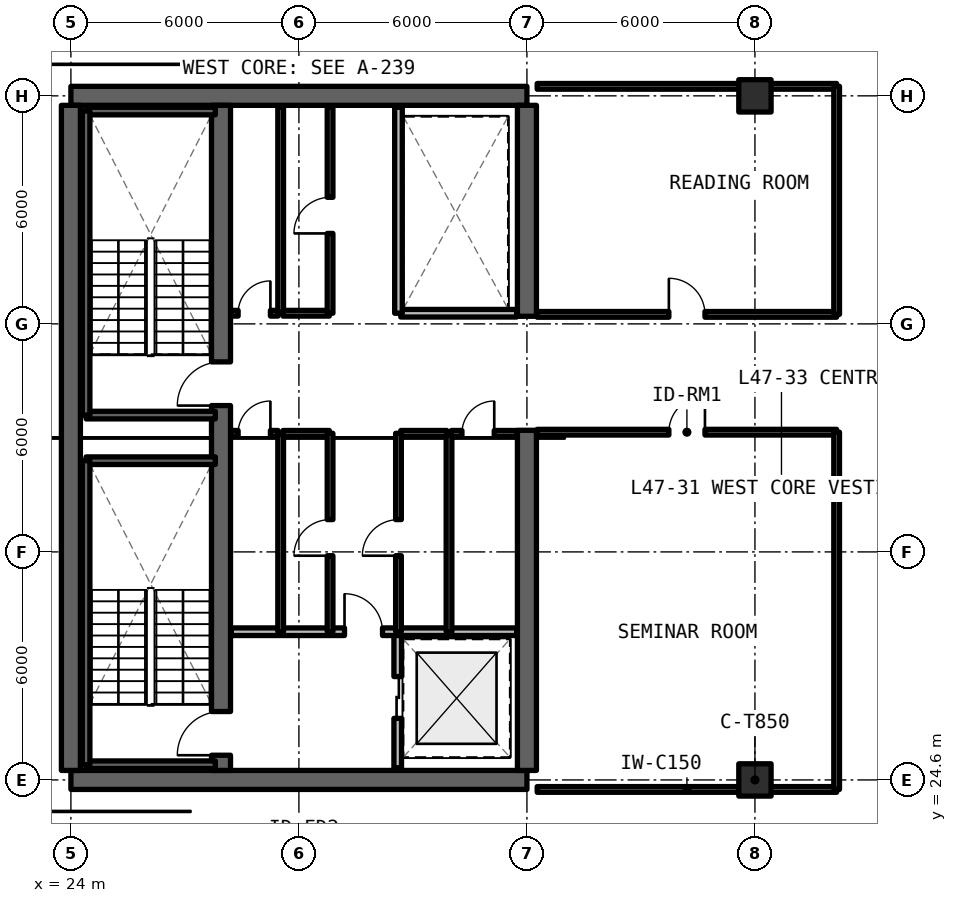
"""IFC4 building model, lengths in metres.
Left out: names, types, materials, properties, quantities, classifications, styles, units other than length and angle.
Written with IfcOpenShell. Run it as: python <this file> out.ifc"""

import sys

from ifc_helpers import new_model, si_unit, direction, frame, frame_2d, origin, origin_2d, place, context, subcontext, project, spatial, rectangle, extrude, element, fill, save


model = new_model("IFC4")
c1 = context("Model", 3, precision=1e-05, world=origin(), true_north=direction((0.0, 1.0)))
c2 = subcontext(c1, "Body", "Model", "MODEL_VIEW")
j1 = project(units=[si_unit("LENGTHUNIT", "METRE"), si_unit("PLANEANGLEUNIT", "RADIAN")], contexts=[c1])
p1 = place(None, origin())
s1 = spatial("IfcSite", under=j1, at=p1, CompositionType="ELEMENT")
p2 = place(p1, origin())
s2 = spatial("IfcBuilding", under=s1, at=p2, CompositionType="ELEMENT")
p3 = place(p2, frame((0.0, 0.0, 169.29)))
s3 = spatial("IfcBuildingStorey", under=s2, at=p3, CompositionType="ELEMENT", Elevation=169.29)
for number, where, z_axis, x_axis in (
    (1, (24.0, 24.6, 0.0), (0.0, 0.0, 1.0), (1.0, 0.0, 0.0)),
    (2, (36.0, 42.6, 0.0), (0.0, 0.0, 1.0), (-1.0, 0.0, 0.0)),
):
    element("IfcWall", number, at=place(p3, frame(where, z_axis=z_axis, x_axis=x_axis)), inside=s3, PredefinedType="SHEAR", context=c2, shape_type="SweptSolid", body=[
        extrude(rectangle(XDim=12.0, YDim=0.5, at=frame_2d((6.0, 0.0))), origin(), (0.0, 0.0, 1.0), 3.63),
    ])
p4 = place(p3, frame((24.0, 24.85, 0.0), z_axis=(0.0, 0.0, 1.0), x_axis=(0.0, 1.0, 0.0)))
e3 = element("IfcWall", 3, at=p4, inside=s3, PredefinedType="SHEAR", context=c2, shape_type="SweptSolid", body=[
    extrude(rectangle(XDim=17.5, YDim=0.5, at=frame_2d((8.75, 0.0))), origin(), (0.0, 0.0, 1.0), 3.63),
])
p5 = place(p3, frame((36.0, 24.85, 0.0), z_axis=(0.0, 0.0, 1.0), x_axis=(0.0, 1.0, 0.0)))
e4 = element("IfcWall", 4, at=p5, inside=s3, PredefinedType="SHEAR", context=c2, shape_type="SweptSolid", body=[
    extrude(rectangle(XDim=8.95, YDim=0.5, at=frame_2d((4.475, 0.0))), origin(), (0.0, 0.0, 1.0), 3.63),
])
p6 = place(p3, frame((36.0, 36.8, 0.0), z_axis=(0.0, 0.0, 1.0), x_axis=(0.0, 1.0, 0.0)))
e5 = element("IfcWall", 5, at=p6, inside=s3, PredefinedType="SHEAR", context=c2, shape_type="SweptSolid", body=[
    extrude(rectangle(XDim=5.55, YDim=0.5, at=frame_2d((2.775, 0.0))), origin(), (0.0, 0.0, 1.0), 3.63),
])
p7 = place(p3, frame((27.95, 24.85, 0.0), z_axis=(0.0, 0.0, 1.0), x_axis=(0.0, 1.0, 0.0)))
e6 = element("IfcWall", 6, at=p7, inside=s3, PredefinedType="SHEAR", context=c2, shape_type="SweptSolid", body=[
    extrude(rectangle(XDim=17.5, YDim=0.5, at=frame_2d((8.75, 0.0))), origin(), (0.0, 0.0, 1.0), 3.63),
])
p8 = place(p7, frame((0.4, 0.0, 0.0)))
e7 = element("IfcOpeningElement", 7, at=p8, cuts=e6, PredefinedType="OPENING", context=c2, shape_type="SweptSolid", body=[
    extrude(rectangle(XDim=1.15, YDim=2.15, at=frame_2d((0.575, 1.075))), frame((0.0, 0.26, 0.0), z_axis=(0.0, -1.0, 0.0), x_axis=(1.0, 0.0, 0.0)), (0.0, 0.0, 1.0), 0.52),
])
p9 = place(p7, frame((9.6, 0.0, 0.0)))
e8 = element("IfcOpeningElement", 8, at=p9, cuts=e6, PredefinedType="OPENING", context=c2, shape_type="SweptSolid", body=[
    extrude(rectangle(XDim=1.15, YDim=2.15, at=frame_2d((0.575, 1.075))), frame((0.0, 0.26, 0.0), z_axis=(0.0, -1.0, 0.0), x_axis=(1.0, 0.0, 0.0)), (0.0, 0.0, 1.0), 0.52),
])
for number, where, z_axis, x_axis in (
    (9, (42.0, 24.6, 0.0), (0.0, 0.0, 1.0), (1.0, 0.0, 0.0)),
    (10, (42.0, 42.6, 0.0), (0.0, 0.0, 1.0), (1.0, 0.0, 0.0)),
):
    element("IfcColumn", number, at=place(p3, frame(where, z_axis=z_axis, x_axis=x_axis)), inside=s3, PredefinedType="COLUMN", context=c2, shape_type="SweptSolid", body=[
        extrude(rectangle(XDim=0.85, YDim=0.85, at=origin_2d()), origin(), (0.0, 0.0, 1.0), 3.63),
    ])
p10 = place(p3, frame((32.6, 24.92, 0.0), z_axis=(0.0, 0.0, 1.0), x_axis=(0.0, 1.0, 0.0)))
e11 = element("IfcWall", 11, at=p10, inside=s3, PredefinedType="SOLIDWALL", context=c2, shape_type="SweptSolid", body=[
    extrude(rectangle(XDim=3.58, YDim=0.2, at=frame_2d((1.79, 0.0))), origin(), (0.0, 0.0, 1.0), 2.57),
])
p11 = place(p10, frame((1.3, 0.0, 0.0)))
e12 = element("IfcOpeningElement", 12, at=p11, cuts=e11, PredefinedType="OPENING", context=c2, shape_type="SweptSolid", body=[
    extrude(rectangle(XDim=1.1, YDim=2.2, at=frame_2d((0.55, 1.1))), frame((0.0, 0.11, 0.0), z_axis=(0.0, -1.0, 0.0), x_axis=(1.0, 0.0, 0.0)), (0.0, 0.0, 1.0), 0.22),
])
p12 = place(p3, frame((28.22, 28.5, 0.0), z_axis=(0.0, 0.0, 1.0), x_axis=(1.0, 0.0, 0.0)))
e13 = element("IfcWall", 13, at=p12, inside=s3, PredefinedType="SOLIDWALL", context=c2, shape_type="SweptSolid", body=[
    extrude(rectangle(XDim=7.51, YDim=0.2, at=frame_2d((3.755, 0.0))), origin(), (0.0, 0.0, 1.0), 2.57),
])
p13 = place(p12, frame((2.98, 0.0, 0.0)))
e14 = element("IfcOpeningElement", 14, at=p13, cuts=e13, PredefinedType="OPENING", context=c2, shape_type="SweptSolid", body=[
    extrude(rectangle(XDim=1.0, YDim=2.15, at=frame_2d((0.5, 1.075))), frame((0.0, 0.11, 0.0), z_axis=(0.0, -1.0, 0.0), x_axis=(1.0, 0.0, 0.0)), (0.0, 0.0, 1.0), 0.22),
])
p14 = place(p3, frame((29.52, 28.5, 0.0), z_axis=(0.0, 0.0, 1.0), x_axis=(0.0, 1.0, 0.0)))
e15 = element("IfcWall", 15, at=p14, inside=s3, PredefinedType="SOLIDWALL", context=c2, shape_type="SweptSolid", body=[
    extrude(rectangle(XDim=5.22, YDim=0.15, at=frame_2d((2.61, 0.0))), origin(), (0.0, 0.0, 1.0), 2.57),
])
p15 = place(p3, frame((28.22, 33.72, 0.0), z_axis=(0.0, 0.0, 1.0), x_axis=(1.0, 0.0, 0.0)))
e16 = element("IfcWall", 16, at=p15, inside=s3, PredefinedType="SOLIDWALL", context=c2, shape_type="SweptSolid", body=[
    extrude(rectangle(XDim=1.23, YDim=0.15, at=frame_2d((0.615, 0.0))), origin(), (0.0, 0.0, 1.0), 2.57),
])
p16 = place(p15, frame((0.18, 0.0, 0.0)))
e17 = element("IfcOpeningElement", 17, at=p16, cuts=e16, PredefinedType="OPENING", context=c2, shape_type="SweptSolid", body=[
    extrude(rectangle(XDim=0.85, YDim=2.1, at=frame_2d((0.425, 1.05))), frame((0.0, 0.085, 0.0), z_axis=(0.0, -1.0, 0.0), x_axis=(1.0, 0.0, 0.0)), (0.0, 0.0, 1.0), 0.17),
])
p17 = place(p3, frame((29.58, 33.72, 0.0), z_axis=(0.0, 0.0, 1.0), x_axis=(1.0, 0.0, 0.0)))
e18 = element("IfcWall", 18, at=p17, inside=s3, PredefinedType="SOLIDWALL", context=c2, shape_type="SweptSolid", body=[
    extrude(rectangle(XDim=1.22, YDim=0.15, at=frame_2d((0.61, 0.0))), origin(), (0.0, 0.0, 1.0), 2.57),
])
p18 = place(p3, frame((30.82, 28.5, 0.0), z_axis=(0.0, 0.0, 1.0), x_axis=(0.0, 1.0, 0.0)))
e19 = element("IfcWall", 19, at=p18, inside=s3, PredefinedType="SOLIDWALL", context=c2, shape_type="SweptSolid", body=[
    extrude(rectangle(XDim=5.22, YDim=0.15, at=frame_2d((2.61, 0.0))), origin(), (0.0, 0.0, 1.0), 2.57),
])
p19 = place(p18, frame((2.0, 0.0, 0.0)))
e20 = element("IfcOpeningElement", 20, at=p19, cuts=e19, PredefinedType="OPENING", context=c2, shape_type="SweptSolid", body=[
    extrude(rectangle(XDim=0.95, YDim=2.15, at=frame_2d((0.475, 1.075))), frame((0.0, 0.085, 0.0), z_axis=(0.0, -1.0, 0.0), x_axis=(1.0, 0.0, 0.0)), (0.0, 0.0, 1.0), 0.17),
])
p20 = place(p3, frame((33.95, 28.5, 0.0), z_axis=(0.0, 0.0, 1.0), x_axis=(0.0, 1.0, 0.0)))
e21 = element("IfcWall", 21, at=p20, inside=s3, PredefinedType="SOLIDWALL", context=c2, shape_type="SweptSolid", body=[
    extrude(rectangle(XDim=5.22, YDim=0.15, at=frame_2d((2.61, 0.0))), origin(), (0.0, 0.0, 1.0), 2.57),
])
p21 = place(p3, frame((32.68, 33.72, 0.0), z_axis=(0.0, 0.0, 1.0), x_axis=(1.0, 0.0, 0.0)))
e22 = element("IfcWall", 22, at=p21, inside=s3, PredefinedType="SOLIDWALL", context=c2, shape_type="SweptSolid", body=[
    extrude(rectangle(XDim=1.21, YDim=0.15, at=frame_2d((0.605, 0.0))), origin(), (0.0, 0.0, 1.0), 2.57),
])
p22 = place(p3, frame((34.01, 33.72, 0.0), z_axis=(0.0, 0.0, 1.0), x_axis=(1.0, 0.0, 0.0)))
e23 = element("IfcWall", 23, at=p22, inside=s3, PredefinedType="SOLIDWALL", context=c2, shape_type="SweptSolid", body=[
    extrude(rectangle(XDim=1.72, YDim=0.15, at=frame_2d((0.86, 0.0))), origin(), (0.0, 0.0, 1.0), 2.57),
])
p23 = place(p22, frame((0.28, 0.0, 0.0)))
e24 = element("IfcOpeningElement", 24, at=p23, cuts=e23, PredefinedType="OPENING", context=c2, shape_type="SweptSolid", body=[
    extrude(rectangle(XDim=0.85, YDim=2.1, at=frame_2d((0.425, 1.05))), frame((0.0, 0.085, 0.0), z_axis=(0.0, -1.0, 0.0), x_axis=(1.0, 0.0, 0.0)), (0.0, 0.0, 1.0), 0.17),
])
p24 = place(p3, frame((32.62, 28.5, 0.0), z_axis=(0.0, 0.0, 1.0), x_axis=(0.0, 1.0, 0.0)))
e25 = element("IfcWall", 25, at=p24, inside=s3, PredefinedType="SOLIDWALL", context=c2, shape_type="SweptSolid", body=[
    extrude(rectangle(XDim=5.22, YDim=0.15, at=frame_2d((2.61, 0.0))), origin(), (0.0, 0.0, 1.0), 2.57),
])
p25 = place(p24, frame((2.0, 0.0, 0.0)))
e26 = element("IfcOpeningElement", 26, at=p25, cuts=e25, PredefinedType="OPENING", context=c2, shape_type="SweptSolid", body=[
    extrude(rectangle(XDim=0.95, YDim=2.15, at=frame_2d((0.475, 1.075))), frame((0.0, 0.085, 0.0), z_axis=(0.0, -1.0, 0.0), x_axis=(1.0, 0.0, 0.0)), (0.0, 0.0, 1.0), 0.17),
])
p26 = place(p3, frame((29.52, 36.88, 0.0), z_axis=(0.0, 0.0, 1.0), x_axis=(0.0, 1.0, 0.0)))
e27 = element("IfcWall", 27, at=p26, inside=s3, PredefinedType="SOLIDWALL", context=c2, shape_type="SweptSolid", body=[
    extrude(rectangle(XDim=5.42, YDim=0.15, at=frame_2d((2.71, 0.0))), origin(), (0.0, 0.0, 1.0), 2.57),
])
p27 = place(p3, frame((28.22, 36.88, 0.0), z_axis=(0.0, 0.0, 1.0), x_axis=(1.0, 0.0, 0.0)))
e28 = element("IfcWall", 28, at=p27, inside=s3, PredefinedType="SOLIDWALL", context=c2, shape_type="SweptSolid", body=[
    extrude(rectangle(XDim=1.23, YDim=0.15, at=frame_2d((0.615, 0.0))), origin(), (0.0, 0.0, 1.0), 2.57),
])
p28 = place(p27, frame((0.18, 0.0, 0.0)))
e29 = element("IfcOpeningElement", 29, at=p28, cuts=e28, PredefinedType="OPENING", context=c2, shape_type="SweptSolid", body=[
    extrude(rectangle(XDim=0.85, YDim=2.1, at=frame_2d((0.425, 1.05))), frame((0.0, 0.085, 0.0), z_axis=(0.0, -1.0, 0.0), x_axis=(1.0, 0.0, 0.0)), (0.0, 0.0, 1.0), 0.17),
])
p29 = place(p3, frame((29.58, 36.88, 0.0), z_axis=(0.0, 0.0, 1.0), x_axis=(1.0, 0.0, 0.0)))
e30 = element("IfcWall", 30, at=p29, inside=s3, PredefinedType="SOLIDWALL", context=c2, shape_type="SweptSolid", body=[
    extrude(rectangle(XDim=1.22, YDim=0.15, at=frame_2d((0.61, 0.0))), origin(), (0.0, 0.0, 1.0), 2.57),
])
p30 = place(p3, frame((30.82, 36.88, 0.0), z_axis=(0.0, 0.0, 1.0), x_axis=(0.0, 1.0, 0.0)))
e31 = element("IfcWall", 31, at=p30, inside=s3, PredefinedType="SOLIDWALL", context=c2, shape_type="SweptSolid", body=[
    extrude(rectangle(XDim=5.42, YDim=0.15, at=frame_2d((2.71, 0.0))), origin(), (0.0, 0.0, 1.0), 2.57),
])
p31 = place(p30, frame((2.1, 0.0, 0.0)))
e32 = element("IfcOpeningElement", 32, at=p31, cuts=e31, PredefinedType="OPENING", context=c2, shape_type="SweptSolid", body=[
    extrude(rectangle(XDim=0.95, YDim=2.15, at=frame_2d((0.475, 1.075))), frame((0.0, 0.085, 0.0), z_axis=(0.0, -1.0, 0.0), x_axis=(1.0, 0.0, 0.0)), (0.0, 0.0, 1.0), 0.17),
])
p32 = place(p3, frame((32.68, 36.88, 0.0), z_axis=(0.0, 0.0, 1.0), x_axis=(1.0, 0.0, 0.0)))
e33 = element("IfcWall", 33, at=p32, inside=s3, PredefinedType="SOLIDWALL", context=c2, shape_type="SweptSolid", body=[
    extrude(rectangle(XDim=3.05, YDim=0.2, at=frame_2d((1.525, 0.0))), origin(), (0.0, 0.0, 1.0), 2.57),
])
p33 = place(p3, frame((32.62, 36.88, 0.0), z_axis=(0.0, 0.0, 1.0), x_axis=(0.0, 1.0, 0.0)))
e34 = element("IfcWall", 34, at=p33, inside=s3, PredefinedType="SOLIDWALL", context=c2, shape_type="SweptSolid", body=[
    extrude(rectangle(XDim=5.42, YDim=0.2, at=frame_2d((2.71, 0.0))), origin(), (0.0, 0.0, 1.0), 2.57),
])
p34 = place(p3, frame((36.27, 24.35, 0.0), z_axis=(0.0, 0.0, 1.0), x_axis=(1.0, 0.0, 0.0)))
e35 = element("IfcWall", 35, at=p34, inside=s3, PredefinedType="SOLIDWALL", context=c2, shape_type="SweptSolid", body=[
    extrude(rectangle(XDim=7.88, YDim=0.15, at=frame_2d((3.94, 0.0))), origin(), (0.0, 0.0, 1.0), 2.57),
])
p35 = place(p3, frame((36.27, 33.75, 0.0), z_axis=(0.0, 0.0, 1.0), x_axis=(1.0, 0.0, 0.0)))
e36 = element("IfcWall", 36, at=p35, inside=s3, PredefinedType="SOLIDWALL", context=c2, shape_type="SweptSolid", body=[
    extrude(rectangle(XDim=7.88, YDim=0.15, at=frame_2d((3.94, 0.0))), origin(), (0.0, 0.0, 1.0), 2.57),
])
p36 = place(p35, frame((3.465, 0.0, 0.0)))
e37 = element("IfcOpeningElement", 37, at=p36, cuts=e36, PredefinedType="OPENING", context=c2, shape_type="SweptSolid", body=[
    extrude(rectangle(XDim=0.95, YDim=2.15, at=frame_2d((0.475, 1.075))), frame((0.0, 0.085, 0.0), z_axis=(0.0, -1.0, 0.0), x_axis=(1.0, 0.0, 0.0)), (0.0, 0.0, 1.0), 0.17),
])
p37 = place(p3, frame((44.15, 24.35, 0.0), z_axis=(0.0, 0.0, 1.0), x_axis=(0.0, 1.0, 0.0)))
e38 = element("IfcWall", 38, at=p37, inside=s3, PredefinedType="SOLIDWALL", context=c2, shape_type="SweptSolid", body=[
    extrude(rectangle(XDim=9.4, YDim=0.15, at=frame_2d((4.7, 0.0))), origin(), (0.0, 0.0, 1.0), 2.57),
])
p38 = place(p3, frame((36.27, 36.85, 0.0), z_axis=(0.0, 0.0, 1.0), x_axis=(1.0, 0.0, 0.0)))
e39 = element("IfcWall", 39, at=p38, inside=s3, PredefinedType="SOLIDWALL", context=c2, shape_type="SweptSolid", body=[
    extrude(rectangle(XDim=7.88, YDim=0.15, at=frame_2d((3.94, 0.0))), origin(), (0.0, 0.0, 1.0), 2.57),
])
p39 = place(p38, frame((3.465, 0.0, 0.0)))
e40 = element("IfcOpeningElement", 40, at=p39, cuts=e39, PredefinedType="OPENING", context=c2, shape_type="SweptSolid", body=[
    extrude(rectangle(XDim=0.95, YDim=2.15, at=frame_2d((0.475, 1.075))), frame((0.0, 0.085, 0.0), z_axis=(0.0, -1.0, 0.0), x_axis=(1.0, 0.0, 0.0)), (0.0, 0.0, 1.0), 0.17),
])
p40 = place(p3, frame((36.27, 42.85, 0.0), z_axis=(0.0, 0.0, 1.0), x_axis=(1.0, 0.0, 0.0)))
e41 = element("IfcWall", 41, at=p40, inside=s3, PredefinedType="SOLIDWALL", context=c2, shape_type="SweptSolid", body=[
    extrude(rectangle(XDim=7.88, YDim=0.15, at=frame_2d((3.94, 0.0))), origin(), (0.0, 0.0, 1.0), 2.57),
])
p41 = place(p3, frame((44.15, 36.85, 0.0), z_axis=(0.0, 0.0, 1.0), x_axis=(0.0, 1.0, 0.0)))
e42 = element("IfcWall", 42, at=p41, inside=s3, PredefinedType="SOLIDWALL", context=c2, shape_type="SweptSolid", body=[
    extrude(rectangle(XDim=6.0, YDim=0.15, at=frame_2d((3.0, 0.0))), origin(), (0.0, 0.0, 1.0), 2.57),
])
for number, where, z_axis, x_axis in (
    (43, (24.4, 25.0, 0.0), (0.0, 0.0, 1.0), (1.0, 0.0, 0.0)),
    (44, (27.8, 33.0, 0.0), (0.0, 0.0, 1.0), (-1.0, 0.0, 0.0)),
):
    element("IfcWall", number, at=place(p3, frame(where, z_axis=z_axis, x_axis=x_axis)), inside=s3, PredefinedType="SOLIDWALL", context=c2, shape_type="SweptSolid", body=[
        extrude(rectangle(XDim=3.4, YDim=0.2, at=frame_2d((1.7, 0.0))), origin(), (0.0, 0.0, 1.0), 3.63),
    ])
p42 = place(p3, frame((24.4, 33.0, 0.0), z_axis=(0.0, 0.0, 1.0), x_axis=(0.0, -1.0, 0.0)))
e45 = element("IfcWall", 45, at=p42, inside=s3, PredefinedType="SOLIDWALL", context=c2, shape_type="SweptSolid", body=[
    extrude(rectangle(XDim=8.0, YDim=0.2, at=frame_2d((4.0, 0.0))), origin(), (0.0, 0.0, 1.0), 3.63),
])
for number, where, z_axis, x_axis in (
    (46, (24.4, 34.2, 0.0), (0.0, 0.0, 1.0), (1.0, 0.0, 0.0)),
    (47, (27.8, 42.2, 0.0), (0.0, 0.0, 1.0), (-1.0, 0.0, 0.0)),
):
    element("IfcWall", number, at=place(p3, frame(where, z_axis=z_axis, x_axis=x_axis)), inside=s3, PredefinedType="SOLIDWALL", context=c2, shape_type="SweptSolid", body=[
        extrude(rectangle(XDim=3.4, YDim=0.2, at=frame_2d((1.7, 0.0))), origin(), (0.0, 0.0, 1.0), 3.63),
    ])
p43 = place(p3, frame((24.4, 42.2, 0.0), z_axis=(0.0, 0.0, 1.0), x_axis=(0.0, -1.0, 0.0)))
e48 = element("IfcWall", 48, at=p43, inside=s3, PredefinedType="SOLIDWALL", context=c2, shape_type="SweptSolid", body=[
    extrude(rectangle(XDim=8.0, YDim=0.2, at=frame_2d((4.0, 0.0))), origin(), (0.0, 0.0, 1.0), 3.63),
])
p44 = place(p11, origin())
e49 = element("IfcDoor", 49, at=p44, inside=s3, OperationType="SLIDING_TO_LEFT", PredefinedType="DOOR", context=c2, shape_type="SweptSolid", body=[
    extrude(rectangle(XDim=1.1, YDim=2.2, at=frame_2d((0.55, 1.1))), frame((0.0, 0.025, 0.0), z_axis=(0.0, -1.0, 0.0), x_axis=(1.0, 0.0, 0.0)), (0.0, 0.0, 1.0), 0.05),
])
fill(e12, e49)
p45 = place(p13, origin())
e50 = element("IfcDoor", 50, at=p45, inside=s3, OperationType="SINGLE_SWING_LEFT", PredefinedType="DOOR", context=c2, shape_type="SweptSolid", body=[
    extrude(rectangle(XDim=1.0, YDim=2.15, at=frame_2d((0.5, 1.075))), frame((0.0, 0.025, 0.0), z_axis=(0.0, -1.0, 0.0), x_axis=(1.0, 0.0, 0.0)), (0.0, 0.0, 1.0), 0.05),
])
fill(e14, e50)
p46 = place(p16, origin())
e51 = element("IfcDoor", 51, at=p46, inside=s3, OperationType="SINGLE_SWING_RIGHT", PredefinedType="DOOR", context=c2, shape_type="SweptSolid", body=[
    extrude(rectangle(XDim=0.85, YDim=2.1, at=frame_2d((0.425, 1.05))), frame((0.0, 0.025, 0.0), z_axis=(0.0, -1.0, 0.0), x_axis=(1.0, 0.0, 0.0)), (0.0, 0.0, 1.0), 0.05),
])
fill(e17, e51)
p47 = place(p19, origin())
e52 = element("IfcDoor", 52, at=p47, inside=s3, OperationType="SINGLE_SWING_LEFT", PredefinedType="DOOR", context=c2, shape_type="SweptSolid", body=[
    extrude(rectangle(XDim=0.95, YDim=2.15, at=frame_2d((0.475, 1.075))), frame((0.0, 0.025, 0.0), z_axis=(0.0, -1.0, 0.0), x_axis=(1.0, 0.0, 0.0)), (0.0, 0.0, 1.0), 0.05),
])
fill(e20, e52)
p48 = place(p23, origin())
e53 = element("IfcDoor", 53, at=p48, inside=s3, OperationType="SINGLE_SWING_RIGHT", PredefinedType="DOOR", context=c2, shape_type="SweptSolid", body=[
    extrude(rectangle(XDim=0.85, YDim=2.1, at=frame_2d((0.425, 1.05))), frame((0.0, 0.025, 0.0), z_axis=(0.0, -1.0, 0.0), x_axis=(1.0, 0.0, 0.0)), (0.0, 0.0, 1.0), 0.05),
])
fill(e24, e53)
p49 = place(p25, origin())
e54 = element("IfcDoor", 54, at=p49, inside=s3, OperationType="SINGLE_SWING_LEFT", PredefinedType="DOOR", context=c2, shape_type="SweptSolid", body=[
    extrude(rectangle(XDim=0.95, YDim=2.15, at=frame_2d((0.475, 1.075))), frame((0.0, 0.025, 0.0), z_axis=(0.0, -1.0, 0.0), x_axis=(1.0, 0.0, 0.0)), (0.0, 0.0, 1.0), 0.05),
])
fill(e26, e54)
p50 = place(p28, origin())
e55 = element("IfcDoor", 55, at=p50, inside=s3, OperationType="SINGLE_SWING_RIGHT", PredefinedType="DOOR", context=c2, shape_type="SweptSolid", body=[
    extrude(rectangle(XDim=0.85, YDim=2.1, at=frame_2d((0.425, 1.05))), frame((0.0, 0.025, 0.0), z_axis=(0.0, -1.0, 0.0), x_axis=(1.0, 0.0, 0.0)), (0.0, 0.0, 1.0), 0.05),
])
fill(e29, e55)
p51 = place(p31, origin())
e56 = element("IfcDoor", 56, at=p51, inside=s3, OperationType="SINGLE_SWING_LEFT", PredefinedType="DOOR", context=c2, shape_type="SweptSolid", body=[
    extrude(rectangle(XDim=0.95, YDim=2.15, at=frame_2d((0.475, 1.075))), frame((0.0, 0.025, 0.0), z_axis=(0.0, -1.0, 0.0), x_axis=(1.0, 0.0, 0.0)), (0.0, 0.0, 1.0), 0.05),
])
fill(e32, e56)
p52 = place(p36, origin())
e57 = element("IfcDoor", 57, at=p52, inside=s3, OperationType="SINGLE_SWING_RIGHT", PredefinedType="DOOR", context=c2, shape_type="SweptSolid", body=[
    extrude(rectangle(XDim=0.95, YDim=2.15, at=frame_2d((0.475, 1.075))), frame((0.0, 0.025, 0.0), z_axis=(0.0, -1.0, 0.0), x_axis=(1.0, 0.0, 0.0)), (0.0, 0.0, 1.0), 0.05),
])
fill(e37, e57)
p53 = place(p39, origin())
e58 = element("IfcDoor", 58, at=p53, inside=s3, OperationType="SINGLE_SWING_LEFT", PredefinedType="DOOR", context=c2, shape_type="SweptSolid", body=[
    extrude(rectangle(XDim=0.95, YDim=2.15, at=frame_2d((0.475, 1.075))), frame((0.0, 0.025, 0.0), z_axis=(0.0, -1.0, 0.0), x_axis=(1.0, 0.0, 0.0)), (0.0, 0.0, 1.0), 0.05),
])
fill(e40, e58)
p54 = place(p8, origin())
e59 = element("IfcDoor", 59, at=p54, inside=s3, OperationType="SINGLE_SWING_RIGHT", PredefinedType="DOOR", context=c2, shape_type="SweptSolid", body=[
    extrude(rectangle(XDim=1.15, YDim=2.15, at=frame_2d((0.575, 1.075))), frame((0.0, 0.025, 0.0), z_axis=(0.0, -1.0, 0.0), x_axis=(1.0, 0.0, 0.0)), (0.0, 0.0, 1.0), 0.05),
])
fill(e7, e59)
p55 = place(p9, origin())
e60 = element("IfcDoor", 60, at=p55, inside=s3, OperationType="SINGLE_SWING_LEFT", PredefinedType="DOOR", context=c2, shape_type="SweptSolid", body=[
    extrude(rectangle(XDim=1.15, YDim=2.15, at=frame_2d((0.575, 1.075))), frame((0.0, 0.025, 0.0), z_axis=(0.0, -1.0, 0.0), x_axis=(1.0, 0.0, 0.0)), (0.0, 0.0, 1.0), 0.05),
])
fill(e8, e60)
save(model, sys.argv[1])
